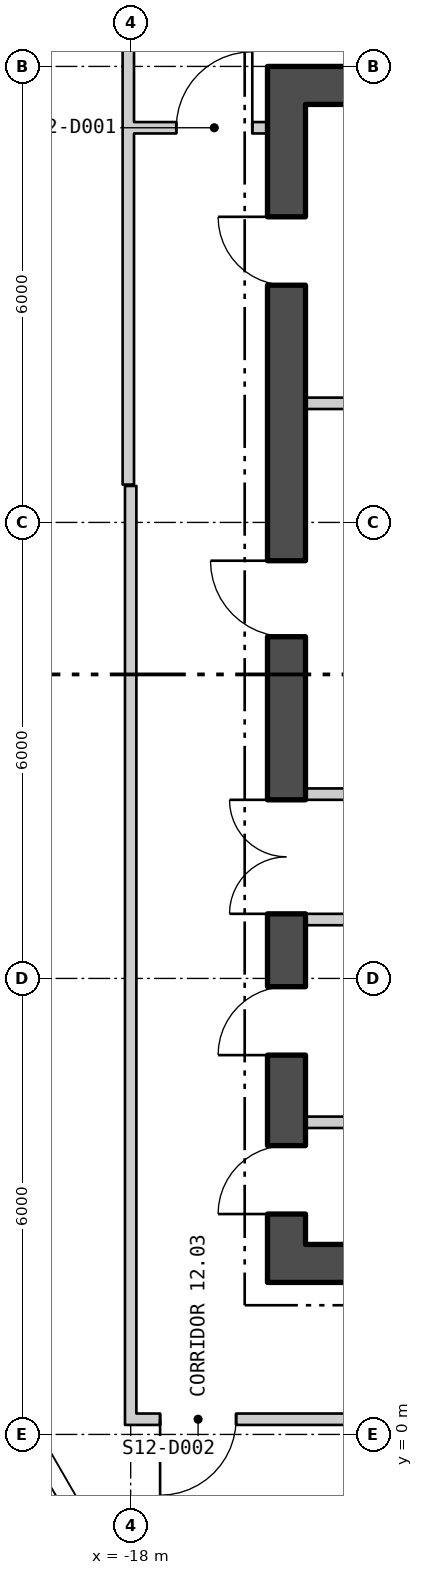
"""IFC4 building model, lengths in metres.
Left out: names, types, materials, properties, quantities, classifications, styles, units other than length and angle.
Written with IfcOpenShell. Run it as: python <this file> out.ifc"""

import sys

from ifc_helpers import new_model, si_unit, direction, frame, frame_2d, origin, place, context, subcontext, project, spatial, polyline, rectangle, outline, extrude, element, fill, save


model = new_model("IFC4")
c1 = context("Model", 3, precision=1e-05, world=origin(), true_north=direction((0.0, 1.0)))
c2 = subcontext(c1, "Body", "Model", "MODEL_VIEW")
j1 = project(units=[si_unit("LENGTHUNIT", "METRE"), si_unit("PLANEANGLEUNIT", "RADIAN")], contexts=[c1])
p1 = place(None, origin())
s1 = spatial("IfcSite", under=j1, at=p1, CompositionType="ELEMENT")
p2 = place(p1, origin())
s2 = spatial("IfcBuilding", under=s1, at=p2, CompositionType="ELEMENT")
p3 = place(p2, frame((0.0, 0.0, 163.2)))
s3 = spatial("IfcBuildingStorey", under=s2, at=p3, CompositionType="ELEMENT", Elevation=163.2)
p4 = place(p3, frame((-26.925, 12.951, -0.18), z_axis=(0.0, 0.0, 1.0), x_axis=(0.499999764979, -0.866025539474, 0.0)))
e1 = element("IfcWall", 1, at=p4, inside=s3, PredefinedType="SOLIDWALL", context=c2, shape_type="SweptSolid", body=[
    extrude(outline(polyline([(-0.13, -0.225), (45.87, -0.225), (45.61, 0.225), (0.13, 0.225), (-0.13, -0.225)])), origin(), (0.0, 0.0, 1.0), 3.68),
])
p5 = place(p4, frame((1.424, 0.0, 1.08)))
e2 = element("IfcOpeningElement", 2, at=p5, cuts=e1, PredefinedType="OPENING", context=c2, shape_type="SweptSolid", body=[
    extrude(rectangle(XDim=2.4, YDim=2.0, at=frame_2d((1.2, 1.0))), frame((0.0, 0.235, 0.0), z_axis=(0.0, -1.0, 0.0), x_axis=(1.0, 0.0, 0.0)), (0.0, 0.0, 1.0), 0.47),
])
p6 = place(p4, frame((5.893, 0.0, 1.08)))
e3 = element("IfcOpeningElement", 3, at=p6, cuts=e1, PredefinedType="OPENING", context=c2, shape_type="SweptSolid", body=[
    extrude(rectangle(XDim=2.4, YDim=2.0, at=frame_2d((1.2, 1.0))), frame((0.0, 0.235, 0.0), z_axis=(0.0, -1.0, 0.0), x_axis=(1.0, 0.0, 0.0)), (0.0, 0.0, 1.0), 0.47),
])
p7 = place(p4, frame((10.401, 0.0, 1.08)))
e4 = element("IfcOpeningElement", 4, at=p7, cuts=e1, PredefinedType="OPENING", context=c2, shape_type="SweptSolid", body=[
    extrude(rectangle(XDim=2.4, YDim=2.0, at=frame_2d((1.2, 1.0))), frame((0.0, 0.235, 0.0), z_axis=(0.0, -1.0, 0.0), x_axis=(1.0, 0.0, 0.0)), (0.0, 0.0, 1.0), 0.47),
])
p8 = place(p4, frame((14.909, 0.0, 1.08)))
e5 = element("IfcOpeningElement", 5, at=p8, cuts=e1, PredefinedType="OPENING", context=c2, shape_type="SweptSolid", body=[
    extrude(rectangle(XDim=2.4, YDim=2.0, at=frame_2d((1.2, 1.0))), frame((0.0, 0.235, 0.0), z_axis=(0.0, -1.0, 0.0), x_axis=(1.0, 0.0, 0.0)), (0.0, 0.0, 1.0), 0.47),
])
p9 = place(p4, frame((19.416, 0.0, 1.08)))
e6 = element("IfcOpeningElement", 6, at=p9, cuts=e1, PredefinedType="OPENING", context=c2, shape_type="SweptSolid", body=[
    extrude(rectangle(XDim=2.4, YDim=2.0, at=frame_2d((1.2, 1.0))), frame((0.0, 0.235, 0.0), z_axis=(0.0, -1.0, 0.0), x_axis=(1.0, 0.0, 0.0)), (0.0, 0.0, 1.0), 0.47),
])
p10 = place(p4, frame((23.924, 0.0, 1.08)))
e7 = element("IfcOpeningElement", 7, at=p10, cuts=e1, PredefinedType="OPENING", context=c2, shape_type="SweptSolid", body=[
    extrude(rectangle(XDim=2.4, YDim=2.0, at=frame_2d((1.2, 1.0))), frame((0.0, 0.235, 0.0), z_axis=(0.0, -1.0, 0.0), x_axis=(1.0, 0.0, 0.0)), (0.0, 0.0, 1.0), 0.47),
])
p11 = place(p4, frame((28.431, 0.0, 1.08)))
e8 = element("IfcOpeningElement", 8, at=p11, cuts=e1, PredefinedType="OPENING", context=c2, shape_type="SweptSolid", body=[
    extrude(rectangle(XDim=2.4, YDim=2.0, at=frame_2d((1.2, 1.0))), frame((0.0, 0.235, 0.0), z_axis=(0.0, -1.0, 0.0), x_axis=(1.0, 0.0, 0.0)), (0.0, 0.0, 1.0), 0.47),
])
p12 = place(p4, frame((32.939, 0.0, 1.08)))
e9 = element("IfcOpeningElement", 9, at=p12, cuts=e1, PredefinedType="OPENING", context=c2, shape_type="SweptSolid", body=[
    extrude(rectangle(XDim=2.4, YDim=2.0, at=frame_2d((1.2, 1.0))), frame((0.0, 0.235, 0.0), z_axis=(0.0, -1.0, 0.0), x_axis=(1.0, 0.0, 0.0)), (0.0, 0.0, 1.0), 0.47),
])
p13 = place(p4, frame((37.447, 0.0, 1.08)))
e10 = element("IfcOpeningElement", 10, at=p13, cuts=e1, PredefinedType="OPENING", context=c2, shape_type="SweptSolid", body=[
    extrude(rectangle(XDim=2.4, YDim=2.0, at=frame_2d((1.2, 1.0))), frame((0.0, 0.235, 0.0), z_axis=(0.0, -1.0, 0.0), x_axis=(1.0, 0.0, 0.0)), (0.0, 0.0, 1.0), 0.47),
])
p14 = place(p4, frame((41.916, 0.0, 1.08)))
e11 = element("IfcOpeningElement", 11, at=p14, cuts=e1, PredefinedType="OPENING", context=c2, shape_type="SweptSolid", body=[
    extrude(rectangle(XDim=2.4, YDim=2.0, at=frame_2d((1.2, 1.0))), frame((0.0, 0.235, 0.0), z_axis=(0.0, -1.0, 0.0), x_axis=(1.0, 0.0, 0.0)), (0.0, 0.0, 1.0), 0.47),
])
p15 = place(p3, frame((-16.2, 2.25, 0.0), z_axis=(0.0, 0.0, 1.0), x_axis=(1.0, 0.0, 0.0)))
e12 = element("IfcWall", 12, at=p15, inside=s3, PredefinedType="SHEAR", context=c2, shape_type="SweptSolid", body=[
    extrude(rectangle(XDim=32.4, YDim=0.5, at=frame_2d((16.2, 0.0))), origin(), (0.0, 0.0, 1.0), 3.7),
])
p16 = place(p15, frame((10.7, 0.0, 0.0)))
e13 = element("IfcOpeningElement", 13, at=p16, cuts=e12, PredefinedType="OPENING", context=c2, shape_type="SweptSolid", body=[
    extrude(rectangle(XDim=1.8, YDim=2.4, at=frame_2d((0.9, 1.2))), frame((0.0, 0.26, 0.0), z_axis=(0.0, -1.0, 0.0), x_axis=(1.0, 0.0, 0.0)), (0.0, 0.0, 1.0), 0.52),
])
p17 = place(p15, frame((20.7, 0.0, 0.0)))
e14 = element("IfcOpeningElement", 14, at=p17, cuts=e12, PredefinedType="OPENING", context=c2, shape_type="SweptSolid", body=[
    extrude(rectangle(XDim=1.8, YDim=2.4, at=frame_2d((0.9, 1.2))), frame((0.0, 0.26, 0.0), z_axis=(0.0, -1.0, 0.0), x_axis=(1.0, 0.0, 0.0)), (0.0, 0.0, 1.0), 0.52),
])
p18 = place(p3, frame((-16.2, 17.75, 0.0), z_axis=(0.0, 0.0, 1.0), x_axis=(1.0, 0.0, 0.0)))
e15 = element("IfcWall", 15, at=p18, inside=s3, PredefinedType="SHEAR", context=c2, shape_type="SweptSolid", body=[
    extrude(rectangle(XDim=32.4, YDim=0.5, at=frame_2d((16.2, 0.0))), origin(), (0.0, 0.0, 1.0), 3.7),
])
p19 = place(p3, frame((-15.95, 2.5, 0.0), z_axis=(0.0, 0.0, 1.0), x_axis=(0.0, 1.0, 0.0)))
e16 = element("IfcWall", 16, at=p19, inside=s3, PredefinedType="SHEAR", context=c2, shape_type="SweptSolid", body=[
    extrude(rectangle(XDim=15.0, YDim=0.5, at=frame_2d((7.5, 0.0))), origin(), (0.0, 0.0, 1.0), 3.7),
])
p20 = place(p19, frame((4.35, 0.0, 0.0)))
e17 = element("IfcOpeningElement", 17, at=p20, cuts=e16, PredefinedType="OPENING", context=c2, shape_type="SweptSolid", body=[
    extrude(rectangle(XDim=1.5, YDim=2.1, at=frame_2d((0.75, 1.05))), frame((0.0, 0.26, 0.0), z_axis=(0.0, -1.0, 0.0), x_axis=(1.0, 0.0, 0.0)), (0.0, 0.0, 1.0), 0.52),
])
p21 = place(p19, frame((0.4, 0.0, 0.0)))
e18 = element("IfcOpeningElement", 18, at=p21, cuts=e16, PredefinedType="OPENING", context=c2, shape_type="SweptSolid", body=[
    extrude(rectangle(XDim=0.9, YDim=2.1, at=frame_2d((0.45, 1.05))), frame((0.0, 0.26, 0.0), z_axis=(0.0, -1.0, 0.0), x_axis=(1.0, 0.0, 0.0)), (0.0, 0.0, 1.0), 0.52),
])
p22 = place(p19, frame((2.491, 0.0, 0.0)))
e19 = element("IfcOpeningElement", 19, at=p22, cuts=e16, PredefinedType="OPENING", context=c2, shape_type="SweptSolid", body=[
    extrude(rectangle(XDim=0.9, YDim=2.1, at=frame_2d((0.45, 1.05))), frame((0.0, 0.26, 0.0), z_axis=(0.0, -1.0, 0.0), x_axis=(1.0, 0.0, 0.0)), (0.0, 0.0, 1.0), 0.52),
])
p23 = place(p19, frame((7.996, 0.0, 0.0)))
e20 = element("IfcOpeningElement", 20, at=p23, cuts=e16, PredefinedType="OPENING", context=c2, shape_type="SweptSolid", body=[
    extrude(rectangle(XDim=1.0, YDim=2.1, at=frame_2d((0.5, 1.05))), frame((0.0, 0.26, 0.0), z_axis=(0.0, -1.0, 0.0), x_axis=(1.0, 0.0, 0.0)), (0.0, 0.0, 1.0), 0.52),
])
p24 = place(p19, frame((12.621, 0.0, 0.0)))
e21 = element("IfcOpeningElement", 21, at=p24, cuts=e16, PredefinedType="OPENING", context=c2, shape_type="SweptSolid", body=[
    extrude(rectangle(XDim=0.9, YDim=2.1, at=frame_2d((0.45, 1.05))), frame((0.0, 0.26, 0.0), z_axis=(0.0, -1.0, 0.0), x_axis=(1.0, 0.0, 0.0)), (0.0, 0.0, 1.0), 0.52),
])
for number, where, z_axis, x_axis in (
    (22, (-15.7, 6.775, 0.0), (0.0, 0.0, 1.0), (1.0, 0.0, 0.0)),
    (23, (-15.7, 8.425, 0.0), (0.0, 0.0, 1.0), (1.0, 0.0, 0.0)),
    (24, (-15.7, 4.107, 0.0), (0.0, 0.0, 1.0), (1.0, 0.0, 0.0)),
    (25, (-15.7, 13.567, 0.0), (0.0, 0.0, 1.0), (1.0, 0.0, 0.0)),
):
    element("IfcWall", number, at=place(p3, frame(where, z_axis=z_axis, x_axis=x_axis)), inside=s3, PredefinedType="PARTITIONING", context=c2, shape_type="SweptSolid", body=[
        extrude(rectangle(XDim=1.2, YDim=0.15, at=frame_2d((0.6, 0.0))), origin(), (0.0, 0.0, 1.0), 3.7),
    ])
p25 = place(p3, frame((-18.031, 12.498, 0.0), z_axis=(0.0, 0.0, 1.0), x_axis=(0.0, 1.0, 0.0)))
e26 = element("IfcWall", 26, at=p25, inside=s3, PredefinedType="PARTITIONING", context=c2, shape_type="SweptSolid", body=[
    extrude(rectangle(XDim=6.802, YDim=0.15, at=frame_2d((3.401, 0.0))), origin(), (0.0, 0.0, 1.0), 3.7),
])
p26 = place(p3, frame((-18.0, 0.125, 0.0), z_axis=(0.0, 0.0, 1.0), x_axis=(0.0, 1.0, 0.0)))
e27 = element("IfcWall", 27, at=p26, inside=s3, PredefinedType="PARTITIONING", context=c2, shape_type="SweptSolid", body=[
    extrude(rectangle(XDim=12.355, YDim=0.15, at=frame_2d((6.178, 0.0))), origin(), (0.0, 0.0, 1.0), 3.7),
])
p27 = place(p3, frame((-17.956, 17.193, 0.0), z_axis=(0.0, 0.0, 1.0), x_axis=(1.0, 0.0, 0.0)))
e28 = element("IfcWall", 28, at=p27, inside=s3, PredefinedType="PARTITIONING", context=c2, shape_type="SweptSolid", body=[
    extrude(rectangle(XDim=1.756, YDim=0.15, at=frame_2d((0.878, 0.0))), origin(), (0.0, 0.0, 1.0), 3.7),
])
p28 = place(p27, frame((0.556, 0.0, 0.0)))
e29 = element("IfcOpeningElement", 29, at=p28, cuts=e28, PredefinedType="OPENING", context=c2, shape_type="SweptSolid", body=[
    extrude(rectangle(XDim=1.0, YDim=2.1, at=frame_2d((0.5, 1.05))), frame((0.0, 0.085, 0.0), z_axis=(0.0, -1.0, 0.0), x_axis=(1.0, 0.0, 0.0)), (0.0, 0.0, 1.0), 0.17),
])
p29 = place(p3, frame((-17.925, 0.2, 0.0), z_axis=(0.0, 0.0, 1.0), x_axis=(1.0, 0.0, 0.0)))
e30 = element("IfcWall", 30, at=p29, inside=s3, PredefinedType="PARTITIONING", context=c2, shape_type="SweptSolid", body=[
    extrude(rectangle(XDim=10.759, YDim=0.15, at=frame_2d((5.38, 0.0))), origin(), (0.0, 0.0, 1.0), 3.7),
])
p30 = place(p29, frame((0.312, 0.0, 0.0)))
e31 = element("IfcOpeningElement", 31, at=p30, cuts=e30, PredefinedType="OPENING", context=c2, shape_type="SweptSolid", body=[
    extrude(rectangle(XDim=1.0, YDim=2.1, at=frame_2d((0.5, 1.05))), frame((0.0, 0.085, 0.0), z_axis=(0.0, -1.0, 0.0), x_axis=(1.0, 0.0, 0.0)), (0.0, 0.0, 1.0), 0.17),
])
p31 = place(p8, origin())
e32 = element("IfcWindow", 32, at=p31, inside=s3, PartitioningType="SINGLE_PANEL", PredefinedType="WINDOW", context=c2, shape_type="SweptSolid", body=[
    extrude(rectangle(XDim=2.4, YDim=2.0, at=frame_2d((1.2, 1.0))), frame((0.0, 0.105, 0.0), z_axis=(0.0, -1.0, 0.0), x_axis=(1.0, 0.0, 0.0)), (0.0, 0.0, 1.0), 0.06),
])
fill(e5, e32)
p32 = place(p20, origin())
e33 = element("IfcDoor", 33, at=p32, inside=s3, OperationType="DOUBLE_DOOR_SINGLE_SWING", PredefinedType="DOOR", context=c2, shape_type="SweptSolid", body=[
    extrude(rectangle(XDim=1.5, YDim=2.1, at=frame_2d((0.75, 1.05))), frame((0.0, 0.025, 0.0), z_axis=(0.0, -1.0, 0.0), x_axis=(1.0, 0.0, 0.0)), (0.0, 0.0, 1.0), 0.05),
])
fill(e17, e33)
p33 = place(p21, origin())
e34 = element("IfcDoor", 34, at=p33, inside=s3, OperationType="SINGLE_SWING_RIGHT", PredefinedType="DOOR", context=c2, shape_type="SweptSolid", body=[
    extrude(rectangle(XDim=0.9, YDim=2.1, at=frame_2d((0.45, 1.05))), frame((0.0, 0.025, 0.0), z_axis=(0.0, -1.0, 0.0), x_axis=(1.0, 0.0, 0.0)), (0.0, 0.0, 1.0), 0.05),
])
fill(e18, e34)
p34 = place(p22, origin())
e35 = element("IfcDoor", 35, at=p34, inside=s3, OperationType="SINGLE_SWING_RIGHT", PredefinedType="DOOR", context=c2, shape_type="SweptSolid", body=[
    extrude(rectangle(XDim=0.9, YDim=2.1, at=frame_2d((0.45, 1.05))), frame((0.0, 0.025, 0.0), z_axis=(0.0, -1.0, 0.0), x_axis=(1.0, 0.0, 0.0)), (0.0, 0.0, 1.0), 0.05),
])
fill(e19, e35)
p35 = place(p23, origin())
e36 = element("IfcDoor", 36, at=p35, inside=s3, OperationType="SINGLE_SWING_LEFT", PredefinedType="DOOR", context=c2, shape_type="SweptSolid", body=[
    extrude(rectangle(XDim=1.0, YDim=2.1, at=frame_2d((0.5, 1.05))), frame((0.0, 0.025, 0.0), z_axis=(0.0, -1.0, 0.0), x_axis=(1.0, 0.0, 0.0)), (0.0, 0.0, 1.0), 0.05),
])
fill(e20, e36)
p36 = place(p24, origin())
e37 = element("IfcDoor", 37, at=p36, inside=s3, OperationType="SINGLE_SWING_LEFT", PredefinedType="DOOR", context=c2, shape_type="SweptSolid", body=[
    extrude(rectangle(XDim=0.9, YDim=2.1, at=frame_2d((0.45, 1.05))), frame((0.0, 0.025, 0.0), z_axis=(0.0, -1.0, 0.0), x_axis=(1.0, 0.0, 0.0)), (0.0, 0.0, 1.0), 0.05),
])
fill(e21, e37)
p37 = place(p28, origin())
e38 = element("IfcDoor", 38, at=p37, inside=s3, OperationType="SINGLE_SWING_LEFT", PredefinedType="DOOR", context=c2, shape_type="SweptSolid", body=[
    extrude(rectangle(XDim=1.0, YDim=2.1, at=frame_2d((0.5, 1.05))), frame((0.0, 0.025, 0.0), z_axis=(0.0, -1.0, 0.0), x_axis=(1.0, 0.0, 0.0)), (0.0, 0.0, 1.0), 0.05),
])
fill(e29, e38)
p38 = place(p30, origin())
e39 = element("IfcDoor", 39, at=p38, inside=s3, OperationType="SINGLE_SWING_LEFT", PredefinedType="DOOR", context=c2, shape_type="SweptSolid", body=[
    extrude(rectangle(XDim=1.0, YDim=2.1, at=frame_2d((0.5, 1.05))), frame((0.0, 0.025, 0.0), z_axis=(0.0, -1.0, 0.0), x_axis=(1.0, 0.0, 0.0)), (0.0, 0.0, 1.0), 0.05),
])
fill(e31, e39)
save(model, sys.argv[1])
